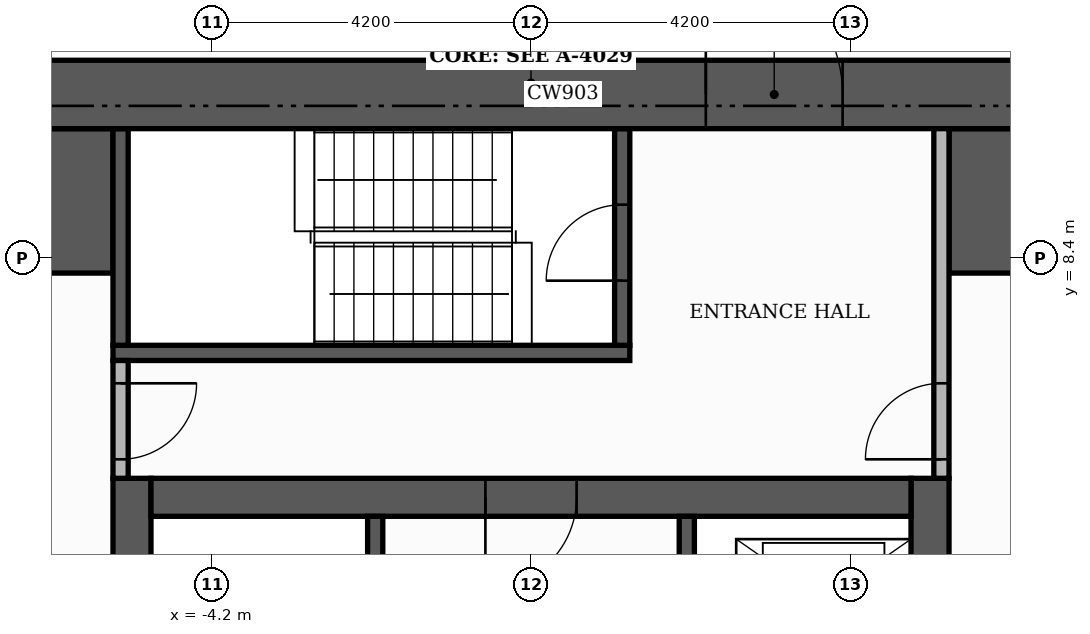
"""IFC4 building model, lengths in metres.
Left out: names, types, materials, properties, quantities, classifications, styles, units other than length and angle.
Written with IfcOpenShell. Run it as: python <this file> out.ifc"""

import sys

from ifc_helpers import new_model, si_unit, direction, frame, frame_2d, origin, place, context, subcontext, project, spatial, rectangle, extrude, element, fill, save


model = new_model("IFC4")
c1 = context("Model", 3, precision=1e-05, world=origin(), true_north=direction((0.0, 1.0)))
c2 = subcontext(c1, "Body", "Model", "MODEL_VIEW")
j1 = project(units=[si_unit("LENGTHUNIT", "METRE"), si_unit("PLANEANGLEUNIT", "RADIAN")], contexts=[c1])
p1 = place(None, origin())
s1 = spatial("IfcSite", under=j1, at=p1, CompositionType="ELEMENT")
p2 = place(p1, origin())
s2 = spatial("IfcBuilding", under=s1, at=p2, CompositionType="ELEMENT")
p3 = place(p2, frame((0.0, 0.0, 176.7)))
s3 = spatial("IfcBuildingStorey", under=s2, at=p3, CompositionType="ELEMENT", Elevation=176.7)
for number, where, z_axis, x_axis in (
    (1, (-5.25, -5.0, 0.0), (0.0, 0.0, 1.0), (0.0, 1.0, 0.0)),
    (2, (5.25, -5.0, 0.0), (0.0, 0.0, 1.0), (0.0, 1.0, 0.0)),
):
    element("IfcWall", number, at=place(p3, frame(where, z_axis=z_axis, x_axis=x_axis)), inside=s3, PredefinedType="SHEAR", context=c2, shape_type="SweptSolid", body=[
        extrude(rectangle(XDim=10.5, YDim=0.5, at=frame_2d((5.25, 0.0))), origin(), (0.0, 0.0, 1.0), 3.4),
    ])
p4 = place(p3, frame((-5.0, 5.25, 0.0), z_axis=(0.0, 0.0, 1.0), x_axis=(1.0, 0.0, 0.0)))
e3 = element("IfcWall", 3, at=p4, inside=s3, PredefinedType="SHEAR", context=c2, shape_type="SweptSolid", body=[
    extrude(rectangle(XDim=10.0, YDim=0.5, at=frame_2d((5.0, 0.0))), origin(), (0.0, 0.0, 1.0), 3.4),
])
p5 = place(p4, frame((4.4, 0.0, 0.0)))
e4 = element("IfcOpeningElement", 4, at=p5, cuts=e3, PredefinedType="OPENING", context=c2, shape_type="SweptSolid", body=[
    extrude(rectangle(XDim=1.2, YDim=2.1, at=frame_2d((0.6, 1.05))), frame((0.0, 0.26, 0.0), z_axis=(0.0, -1.0, 0.0), x_axis=(1.0, 0.0, 0.0)), (0.0, 0.0, 1.0), 0.52),
])
for number, where, z_axis, x_axis in (
    (5, (-10.1, 9.15, 0.0), (0.0, 0.0, 1.0), (1.0, 0.0, 0.0)),
    (6, (5.5, 9.15, 0.0), (0.0, 0.0, 1.0), (1.0, 0.0, 0.0)),
):
    element("IfcWall", number, at=place(p3, frame(where, z_axis=z_axis, x_axis=x_axis)), inside=s3, PredefinedType="SHEAR", context=c2, shape_type="SweptSolid", body=[
        extrude(rectangle(XDim=4.6, YDim=1.9, at=frame_2d((2.3, 0.0))), origin(), (0.0, 0.0, 1.0), 3.4),
    ])
p6 = place(p3, frame((-2.05, -1.4, 0.0), z_axis=(0.0, 0.0, 1.0), x_axis=(0.0, 1.0, 0.0)))
e7 = element("IfcWall", 7, at=p6, inside=s3, PredefinedType="SHEAR", context=c2, shape_type="SweptSolid", body=[
    extrude(rectangle(XDim=6.4, YDim=0.2, at=frame_2d((3.2, 0.0))), origin(), (0.0, 0.0, 1.0), 3.4),
])
p7 = place(p6, frame((0.15, 0.0, 0.0)))
e8 = element("IfcOpeningElement", 8, at=p7, cuts=e7, PredefinedType="OPENING", context=c2, shape_type="SweptSolid", body=[
    extrude(rectangle(XDim=1.0, YDim=2.1, at=frame_2d((0.5, 1.05))), frame((0.0, 0.11, 0.0), z_axis=(0.0, -1.0, 0.0), x_axis=(1.0, 0.0, 0.0)), (0.0, 0.0, 1.0), 0.22),
])
p8 = place(p3, frame((-5.5, 7.15, 0.0), z_axis=(0.0, 0.0, 1.0), x_axis=(1.0, 0.0, 0.0)))
e9 = element("IfcWall", 9, at=p8, inside=s3, PredefinedType="SHEAR", context=c2, shape_type="SweptSolid", body=[
    extrude(rectangle(XDim=6.8, YDim=0.2, at=frame_2d((3.4, 0.0))), origin(), (0.0, 0.0, 1.0), 3.4),
])
p9 = place(p3, frame((-5.4, 7.25, 0.0), z_axis=(0.0, 0.0, 1.0), x_axis=(0.0, 1.0, 0.0)))
e10 = element("IfcWall", 10, at=p9, inside=s3, PredefinedType="SHEAR", context=c2, shape_type="SweptSolid", body=[
    extrude(rectangle(XDim=2.85, YDim=0.2, at=frame_2d((1.425, 0.0))), origin(), (0.0, 0.0, 1.0), 3.4),
])
p10 = place(p3, frame((1.2, 7.25, 0.0), z_axis=(0.0, 0.0, 1.0), x_axis=(0.0, 1.0, 0.0)))
e11 = element("IfcWall", 11, at=p10, inside=s3, PredefinedType="SHEAR", context=c2, shape_type="SweptSolid", body=[
    extrude(rectangle(XDim=2.85, YDim=0.2, at=frame_2d((1.425, 0.0))), origin(), (0.0, 0.0, 1.0), 3.4),
])
p11 = place(p10, frame((0.85, 0.0, 0.0)))
e12 = element("IfcOpeningElement", 12, at=p11, cuts=e11, PredefinedType="OPENING", context=c2, shape_type="SweptSolid", body=[
    extrude(rectangle(XDim=1.0, YDim=2.1, at=frame_2d((0.5, 1.05))), frame((0.0, 0.11, 0.0), z_axis=(0.0, -1.0, 0.0), x_axis=(1.0, 0.0, 0.0)), (0.0, 0.0, 1.0), 0.22),
])
p12 = place(p3, frame((2.05, 1.6, 0.0), z_axis=(0.0, 0.0, 1.0), x_axis=(0.0, 1.0, 0.0)))
e13 = element("IfcWall", 13, at=p12, inside=s3, PredefinedType="SHEAR", context=c2, shape_type="SweptSolid", body=[
    extrude(rectangle(XDim=3.4, YDim=0.2, at=frame_2d((1.7, 0.0))), origin(), (0.0, 0.0, 1.0), 3.4),
])
p13 = place(p12, frame((1.75, 0.0, 0.0)))
e14 = element("IfcOpeningElement", 14, at=p13, cuts=e13, PredefinedType="OPENING", context=c2, shape_type="SweptSolid", body=[
    extrude(rectangle(XDim=1.1, YDim=2.1, at=frame_2d((0.55, 1.05))), frame((0.0, 0.11, 0.0), z_axis=(0.0, -1.0, 0.0), x_axis=(1.0, 0.0, 0.0)), (0.0, 0.0, 1.0), 0.22),
])
p14 = place(p12, frame((0.15, 0.0, 0.0)))
e15 = element("IfcOpeningElement", 15, at=p14, cuts=e13, PredefinedType="OPENING", context=c2, shape_type="SweptSolid", body=[
    extrude(rectangle(XDim=0.8, YDim=2.1, at=frame_2d((0.4, 1.05))), frame((0.0, 0.11, 0.0), z_axis=(0.0, -1.0, 0.0), x_axis=(1.0, 0.0, 0.0)), (0.0, 0.0, 1.0), 0.22),
])
p15 = place(p3, frame((-11.0, 10.55, 0.0), z_axis=(0.0, 0.0, 1.0), x_axis=(1.0, 0.0, 0.0)))
e16 = element("IfcWall", 16, at=p15, inside=s3, PredefinedType="SHEAR", context=c2, shape_type="SweptSolid", body=[
    extrude(rectangle(XDim=22.0, YDim=0.9, at=frame_2d((11.0, 0.0))), origin(), (0.0, 0.0, 1.0), 3.4),
])
p16 = place(p15, frame((13.3, 0.0, 0.0)))
e17 = element("IfcOpeningElement", 17, at=p16, cuts=e16, PredefinedType="OPENING", context=c2, shape_type="SweptSolid", body=[
    extrude(rectangle(XDim=1.8, YDim=2.2, at=frame_2d((0.9, 1.1))), frame((0.0, 0.46, 0.0), z_axis=(0.0, -1.0, 0.0), x_axis=(1.0, 0.0, 0.0)), (0.0, 0.0, 1.0), 0.92),
])
p17 = place(p3, frame((-5.4, 5.5, 0.0), z_axis=(0.0, 0.0, 1.0), x_axis=(0.0, 1.0, 0.0)))
e18 = element("IfcWall", 18, at=p17, inside=s3, PredefinedType="PARTITIONING", context=c2, shape_type="SweptSolid", body=[
    extrude(rectangle(XDim=1.55, YDim=0.2, at=frame_2d((0.775, 0.0))), origin(), (0.0, 0.0, 1.0), 3.4),
])
p18 = place(p17, frame((0.25, 0.0, 0.0)))
e19 = element("IfcOpeningElement", 19, at=p18, cuts=e18, PredefinedType="OPENING", context=c2, shape_type="SweptSolid", body=[
    extrude(rectangle(XDim=1.0, YDim=2.1, at=frame_2d((0.5, 1.05))), frame((0.0, 0.11, 0.0), z_axis=(0.0, -1.0, 0.0), x_axis=(1.0, 0.0, 0.0)), (0.0, 0.0, 1.0), 0.22),
])
p19 = place(p3, frame((5.4, 5.5, 0.0), z_axis=(0.0, 0.0, 1.0), x_axis=(0.0, 1.0, 0.0)))
e20 = element("IfcWall", 20, at=p19, inside=s3, PredefinedType="PARTITIONING", context=c2, shape_type="SweptSolid", body=[
    extrude(rectangle(XDim=4.6, YDim=0.2, at=frame_2d((2.3, 0.0))), origin(), (0.0, 0.0, 1.0), 3.4),
])
p20 = place(p19, frame((0.25, 0.0, 0.0)))
e21 = element("IfcOpeningElement", 21, at=p20, cuts=e20, PredefinedType="OPENING", context=c2, shape_type="SweptSolid", body=[
    extrude(rectangle(XDim=1.0, YDim=2.1, at=frame_2d((0.5, 1.05))), frame((0.0, 0.11, 0.0), z_axis=(0.0, -1.0, 0.0), x_axis=(1.0, 0.0, 0.0)), (0.0, 0.0, 1.0), 0.22),
])
p21 = place(p5, frame((1.2, 0.0, 0.0), z_axis=(0.0, 0.0, 1.0), x_axis=(-1.0, 0.0, 0.0)))
e22 = element("IfcDoor", 22, at=p21, inside=s3, OperationType="SINGLE_SWING_LEFT", PredefinedType="DOOR", context=c2, shape_type="SweptSolid", body=[
    extrude(rectangle(XDim=1.2, YDim=2.1, at=frame_2d((0.6, 1.05))), frame((0.0, 0.025, 0.0), z_axis=(0.0, -1.0, 0.0), x_axis=(1.0, 0.0, 0.0)), (0.0, 0.0, 1.0), 0.05),
])
fill(e4, e22)
p22 = place(p11, origin())
e23 = element("IfcDoor", 23, at=p22, inside=s3, OperationType="SINGLE_SWING_LEFT", PredefinedType="DOOR", context=c2, shape_type="SweptSolid", body=[
    extrude(rectangle(XDim=1.0, YDim=2.1, at=frame_2d((0.5, 1.05))), frame((0.0, 0.025, 0.0), z_axis=(0.0, -1.0, 0.0), x_axis=(1.0, 0.0, 0.0)), (0.0, 0.0, 1.0), 0.05),
])
fill(e12, e23)
p23 = place(p18, frame((1.0, 0.0, 0.0), z_axis=(0.0, 0.0, 1.0), x_axis=(-1.0, 0.0, 0.0)))
e24 = element("IfcDoor", 24, at=p23, inside=s3, OperationType="SINGLE_SWING_RIGHT", PredefinedType="DOOR", context=c2, shape_type="SweptSolid", body=[
    extrude(rectangle(XDim=1.0, YDim=2.1, at=frame_2d((0.5, 1.05))), frame((0.0, 0.025, 0.0), z_axis=(0.0, -1.0, 0.0), x_axis=(1.0, 0.0, 0.0)), (0.0, 0.0, 1.0), 0.05),
])
fill(e19, e24)
p24 = place(p20, origin())
e25 = element("IfcDoor", 25, at=p24, inside=s3, OperationType="SINGLE_SWING_LEFT", PredefinedType="DOOR", context=c2, shape_type="SweptSolid", body=[
    extrude(rectangle(XDim=1.0, YDim=2.1, at=frame_2d((0.5, 1.05))), frame((0.0, 0.025, 0.0), z_axis=(0.0, -1.0, 0.0), x_axis=(1.0, 0.0, 0.0)), (0.0, 0.0, 1.0), 0.05),
])
fill(e21, e25)
p25 = place(p16, origin())
e26 = element("IfcDoor", 26, at=p25, inside=s3, OperationType="DOUBLE_DOOR_SINGLE_SWING", PredefinedType="DOOR", context=c2, shape_type="SweptSolid", body=[
    extrude(rectangle(XDim=1.8, YDim=2.2, at=frame_2d((0.9, 1.1))), frame((0.0, 0.025, 0.0), z_axis=(0.0, -1.0, 0.0), x_axis=(1.0, 0.0, 0.0)), (0.0, 0.0, 1.0), 0.05),
])
fill(e17, e26)
save(model, sys.argv[1])
